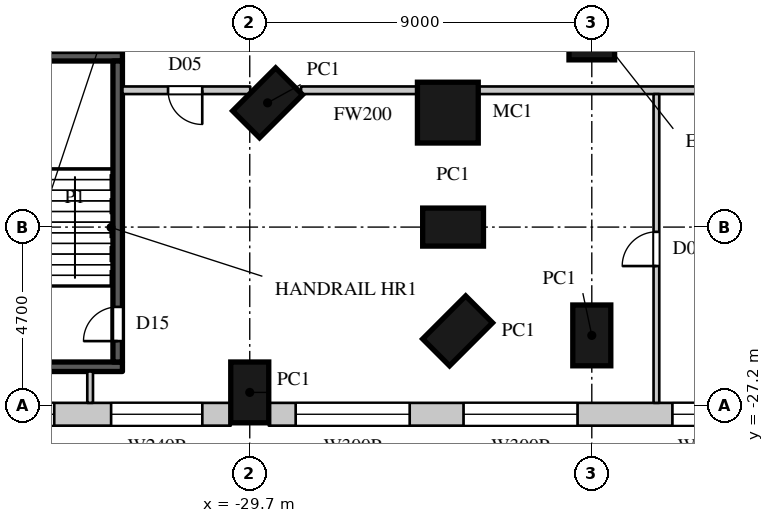
"""IFC4 building model, lengths in metres.
Left out: names, types, materials, properties, quantities, classifications, styles, units other than length and angle.
Written with IfcOpenShell. Run it as: python <this file> out.ifc"""

import sys

from ifc_helpers import new_model, si_unit, direction, frame, frame_2d, origin, origin_2d, place, context, subcontext, project, spatial, rectangle, circle, extrude, element, fill, save


model = new_model("IFC4")
c1 = context("Model", 3, precision=1e-05, world=origin(), true_north=direction((0.0, 1.0)))
c2 = subcontext(c1, "Body", "Model", "MODEL_VIEW")
j1 = project(units=[si_unit("LENGTHUNIT", "METRE"), si_unit("PLANEANGLEUNIT", "RADIAN")], contexts=[c1])
p1 = place(None, origin())
s1 = spatial("IfcSite", under=j1, at=p1, CompositionType="ELEMENT")
p2 = place(p1, origin())
s2 = spatial("IfcBuilding", under=s1, at=p2, CompositionType="ELEMENT")
p3 = place(p2, frame((0.0, 0.0, 36.0)))
s3 = spatial("IfcBuildingStorey", under=s2, at=p3, CompositionType="ELEMENT", Elevation=36.0)
p4 = place(p3, frame((-29.231, -19.231, 0.0), z_axis=(0.0, 0.0, 1.0), x_axis=(0.707106781187, -0.707106781187, 0.0)))
e1 = element("IfcColumn", 1, at=p4, inside=s3, PredefinedType="COLUMN", context=c2, shape_type="SweptSolid", body=[
    extrude(rectangle(XDim=1.0, YDim=1.6, at=origin_2d()), origin(), (0.0, 0.0, 1.0), 8.0),
])
p5 = place(p3, frame((-24.488, -19.488, 0.0), z_axis=(0.0, 0.0, 1.0), x_axis=(1.0, 0.0, 0.0)))
e2 = element("IfcColumn", 2, at=p5, inside=s3, PredefinedType="COLUMN", context=c2, shape_type="SweptSolid", body=[
    extrude(circle(Radius=0.8, at=origin_2d()), origin(), (0.0, 0.0, 1.0), 8.0),
])
for number, where, z_axis, x_axis in (
    (3, (-24.35, -22.5, 0.0), (0.0, 0.0, 1.0), (0.0, -1.0, 0.0)),
    (4, (-24.231, -25.231, 0.0), (0.0, 0.0, 1.0), (0.707, -0.707, 0.0)),
    (5, (-20.7, -25.35, 0.0), (0.0, 0.0, 1.0), (1.0, 0.0, 0.0)),
    (6, (-29.7, -26.85, 0.0), (0.0, 0.0, 1.0), (1.0, 0.0, 0.0)),
):
    element("IfcColumn", number, at=place(p3, frame(where, z_axis=z_axis, x_axis=x_axis)), inside=s3, PredefinedType="COLUMN", context=c2, shape_type="SweptSolid", body=[
        extrude(rectangle(XDim=1.0, YDim=1.6, at=origin_2d()), origin(), (0.0, 0.0, 1.0), 8.0),
    ])
p6 = place(p3, frame((-20.7, -17.5, 0.0), z_axis=(0.0, 0.0, 1.0), x_axis=(1.0, 0.0, 0.0)))
e7 = element("IfcColumn", 7, at=p6, inside=s3, PredefinedType="COLUMN", context=c2, shape_type="SweptSolid", body=[
    extrude(circle(Radius=0.6, at=origin_2d()), origin(), (0.0, 0.0, 1.0), 8.0),
])
p7 = place(p3, frame((-37.993, -27.425, 0.0), z_axis=(0.0, 0.0, 1.0), x_axis=(1.0, 0.0, 0.0)))
e8 = element("IfcWall", 8, at=p7, inside=s3, PredefinedType="ELEMENTEDWALL", context=c2, shape_type="SweptSolid", body=[
    extrude(rectangle(XDim=7.793, YDim=0.6, at=frame_2d((3.896, 0.0))), origin(), (0.0, 0.0, 1.0), 7.6),
])
p8 = place(p7, frame((0.748, 0.0, 1.5)))
e9 = element("IfcOpeningElement", 9, at=p8, cuts=e8, PredefinedType="OPENING", context=c2, shape_type="SweptSolid", body=[
    extrude(rectangle(XDim=2.4, YDim=2.4, at=frame_2d((1.2, 1.2))), frame((0.0, 0.31, 0.0), z_axis=(0.0, -1.0, 0.0), x_axis=(1.0, 0.0, 0.0)), (0.0, 0.0, 1.0), 0.62),
])
p9 = place(p7, frame((4.645, 0.0, 1.5)))
e10 = element("IfcOpeningElement", 10, at=p9, cuts=e8, PredefinedType="OPENING", context=c2, shape_type="SweptSolid", body=[
    extrude(rectangle(XDim=2.4, YDim=2.4, at=frame_2d((1.2, 1.2))), frame((0.0, 0.31, 0.0), z_axis=(0.0, -1.0, 0.0), x_axis=(1.0, 0.0, 0.0)), (0.0, 0.0, 1.0), 0.62),
])
p10 = place(p3, frame((-29.2, -27.425, 0.0), z_axis=(0.0, 0.0, 1.0), x_axis=(1.0, 0.0, 0.0)))
e11 = element("IfcWall", 11, at=p10, inside=s3, PredefinedType="ELEMENTEDWALL", context=c2, shape_type="SweptSolid", body=[
    extrude(rectangle(XDim=53.0, YDim=0.6, at=frame_2d((26.5, 0.0))), origin(), (0.0, 0.0, 1.0), 7.6),
])
p11 = place(p10, frame((0.708, 0.0, 1.5)))
e12 = element("IfcOpeningElement", 12, at=p11, cuts=e11, PredefinedType="OPENING", context=c2, shape_type="SweptSolid", body=[
    extrude(rectangle(XDim=3.0, YDim=2.4, at=frame_2d((1.5, 1.2))), frame((0.0, 0.31, 0.0), z_axis=(0.0, -1.0, 0.0), x_axis=(1.0, 0.0, 0.0)), (0.0, 0.0, 1.0), 0.62),
])
p12 = place(p10, frame((5.125, 0.0, 1.5)))
e13 = element("IfcOpeningElement", 13, at=p12, cuts=e11, PredefinedType="OPENING", context=c2, shape_type="SweptSolid", body=[
    extrude(rectangle(XDim=3.0, YDim=2.4, at=frame_2d((1.5, 1.2))), frame((0.0, 0.31, 0.0), z_axis=(0.0, -1.0, 0.0), x_axis=(1.0, 0.0, 0.0)), (0.0, 0.0, 1.0), 0.62),
])
p13 = place(p10, frame((13.958, 0.0, 1.5)))
e14 = element("IfcOpeningElement", 14, at=p13, cuts=e11, PredefinedType="OPENING", context=c2, shape_type="SweptSolid", body=[
    extrude(rectangle(XDim=3.0, YDim=2.4, at=frame_2d((1.5, 1.2))), frame((0.0, 0.31, 0.0), z_axis=(0.0, -1.0, 0.0), x_axis=(1.0, 0.0, 0.0)), (0.0, 0.0, 1.0), 0.62),
])
p14 = place(p10, frame((22.792, 0.0, 1.5)))
e15 = element("IfcOpeningElement", 15, at=p14, cuts=e11, PredefinedType="OPENING", context=c2, shape_type="SweptSolid", body=[
    extrude(rectangle(XDim=3.0, YDim=2.4, at=frame_2d((1.5, 1.2))), frame((0.0, 0.31, 0.0), z_axis=(0.0, -1.0, 0.0), x_axis=(1.0, 0.0, 0.0)), (0.0, 0.0, 1.0), 0.62),
])
p15 = place(p10, frame((27.208, 0.0, 1.5)))
e16 = element("IfcOpeningElement", 16, at=p15, cuts=e11, PredefinedType="OPENING", context=c2, shape_type="SweptSolid", body=[
    extrude(rectangle(XDim=3.0, YDim=2.4, at=frame_2d((1.5, 1.2))), frame((0.0, 0.31, 0.0), z_axis=(0.0, -1.0, 0.0), x_axis=(1.0, 0.0, 0.0)), (0.0, 0.0, 1.0), 0.62),
])
p16 = place(p10, frame((31.625, 0.0, 1.5)))
e17 = element("IfcOpeningElement", 17, at=p16, cuts=e11, PredefinedType="OPENING", context=c2, shape_type="SweptSolid", body=[
    extrude(rectangle(XDim=3.0, YDim=2.4, at=frame_2d((1.5, 1.2))), frame((0.0, 0.31, 0.0), z_axis=(0.0, -1.0, 0.0), x_axis=(1.0, 0.0, 0.0)), (0.0, 0.0, 1.0), 0.62),
])
p17 = place(p10, frame((36.042, 0.0, 1.5)))
e18 = element("IfcOpeningElement", 18, at=p17, cuts=e11, PredefinedType="OPENING", context=c2, shape_type="SweptSolid", body=[
    extrude(rectangle(XDim=3.0, YDim=2.4, at=frame_2d((1.5, 1.2))), frame((0.0, 0.31, 0.0), z_axis=(0.0, -1.0, 0.0), x_axis=(1.0, 0.0, 0.0)), (0.0, 0.0, 1.0), 0.62),
])
p18 = place(p10, frame((40.458, 0.0, 1.5)))
e19 = element("IfcOpeningElement", 19, at=p18, cuts=e11, PredefinedType="OPENING", context=c2, shape_type="SweptSolid", body=[
    extrude(rectangle(XDim=3.0, YDim=2.4, at=frame_2d((1.5, 1.2))), frame((0.0, 0.31, 0.0), z_axis=(0.0, -1.0, 0.0), x_axis=(1.0, 0.0, 0.0)), (0.0, 0.0, 1.0), 0.62),
])
p19 = place(p10, frame((44.875, 0.0, 1.5)))
e20 = element("IfcOpeningElement", 20, at=p19, cuts=e11, PredefinedType="OPENING", context=c2, shape_type="SweptSolid", body=[
    extrude(rectangle(XDim=3.0, YDim=2.4, at=frame_2d((1.5, 1.2))), frame((0.0, 0.31, 0.0), z_axis=(0.0, -1.0, 0.0), x_axis=(1.0, 0.0, 0.0)), (0.0, 0.0, 1.0), 0.62),
])
p20 = place(p10, frame((49.292, 0.0, 1.5)))
e21 = element("IfcOpeningElement", 21, at=p20, cuts=e11, PredefinedType="OPENING", context=c2, shape_type="SweptSolid", body=[
    extrude(rectangle(XDim=3.0, YDim=2.4, at=frame_2d((1.5, 1.2))), frame((0.0, 0.31, 0.0), z_axis=(0.0, -1.0, 0.0), x_axis=(1.0, 0.0, 0.0)), (0.0, 0.0, 1.0), 0.62),
])
p21 = place(p10, frame((10.621, 0.0, 1.5)))
e22 = element("IfcOpeningElement", 22, at=p21, cuts=e11, PredefinedType="OPENING", context=c2, shape_type="SweptSolid", body=[
    extrude(rectangle(XDim=1.8, YDim=2.4, at=frame_2d((0.9, 1.2))), frame((0.0, 0.31, 0.0), z_axis=(0.0, -1.0, 0.0), x_axis=(1.0, 0.0, 0.0)), (0.0, 0.0, 1.0), 0.62),
])
p22 = place(p10, frame((19.137, 0.0, 1.5)))
e23 = element("IfcOpeningElement", 23, at=p22, cuts=e11, PredefinedType="OPENING", context=c2, shape_type="SweptSolid", body=[
    extrude(rectangle(XDim=2.1, YDim=2.4, at=frame_2d((1.05, 1.2))), frame((0.0, 0.31, 0.0), z_axis=(0.0, -1.0, 0.0), x_axis=(1.0, 0.0, 0.0)), (0.0, 0.0, 1.0), 0.62),
])
p23 = place(p3, frame((-33.05, -18.9, 0.0), z_axis=(0.0, 0.0, 1.0), x_axis=(1.0, 0.0, 0.0)))
e24 = element("IfcWall", 24, at=p23, inside=s3, PredefinedType="PARTITIONING", context=c2, shape_type="SweptSolid", body=[
    extrude(rectangle(XDim=3.363, YDim=0.2, at=frame_2d((1.682, 0.0))), origin(), (0.0, 0.0, 1.0), 7.598),
])
p24 = place(p23, frame((1.2, 0.0, 0.0)))
e25 = element("IfcOpeningElement", 25, at=p24, cuts=e24, PredefinedType="OPENING", context=c2, shape_type="SweptSolid", body=[
    extrude(rectangle(XDim=0.9, YDim=2.2, at=frame_2d((0.45, 1.1))), frame((0.0, 0.11, 0.0), z_axis=(0.0, -1.0, 0.0), x_axis=(1.0, 0.0, 0.0)), (0.0, 0.0, 1.0), 0.22),
])
p25 = place(p3, frame((-28.35, -18.9, 0.0), z_axis=(0.0, 0.0, 1.0), x_axis=(1.0, 0.0, 0.0)))
e26 = element("IfcWall", 26, at=p25, inside=s3, PredefinedType="PARTITIONING", context=c2, shape_type="SweptSolid", body=[
    extrude(rectangle(XDim=3.244, YDim=0.2, at=frame_2d((1.622, 0.0))), origin(), (0.0, 0.0, 1.0), 7.598),
])
p26 = place(p3, frame((-23.869, -18.9, 0.0), z_axis=(0.0, 0.0, 1.0), x_axis=(1.0, 0.0, 0.0)))
e27 = element("IfcWall", 27, at=p26, inside=s3, PredefinedType="PARTITIONING", context=c2, shape_type="SweptSolid", body=[
    extrude(rectangle(XDim=13.269, YDim=0.2, at=frame_2d((6.635, 0.0))), origin(), (0.0, 0.0, 1.0), 7.598),
])
p27 = place(p26, frame((8.55, 0.0, 0.0)))
e28 = element("IfcOpeningElement", 28, at=p27, cuts=e27, PredefinedType="OPENING", context=c2, shape_type="SweptSolid", body=[
    extrude(rectangle(XDim=0.9, YDim=2.2, at=frame_2d((0.45, 1.1))), frame((0.0, 0.11, 0.0), z_axis=(0.0, -1.0, 0.0), x_axis=(1.0, 0.0, 0.0)), (0.0, 0.0, 1.0), 0.22),
])
p28 = place(p3, frame((-33.9, -27.125, 0.0), z_axis=(0.0, 0.0, 1.0), x_axis=(0.0, 1.0, 0.0)))
e29 = element("IfcWall", 29, at=p28, inside=s3, PredefinedType="PARTITIONING", context=c2, shape_type="SweptSolid", body=[
    extrude(rectangle(XDim=0.825, YDim=0.15, at=frame_2d((0.413, 0.0))), origin(), (0.0, 0.0, 1.0), 7.598),
])
p29 = place(p3, frame((-19.0, -27.125, 0.0), z_axis=(0.0, 0.0, 1.0), x_axis=(0.0, 1.0, 0.0)))
e30 = element("IfcWall", 30, at=p29, inside=s3, PredefinedType="PARTITIONING", context=c2, shape_type="SweptSolid", body=[
    extrude(rectangle(XDim=8.125, YDim=0.15, at=frame_2d((4.062, 0.0))), origin(), (0.0, 0.0, 1.0), 7.598),
])
p30 = place(p29, frame((3.6, 0.0, 0.0)))
e31 = element("IfcOpeningElement", 31, at=p30, cuts=e30, PredefinedType="OPENING", context=c2, shape_type="SweptSolid", body=[
    extrude(rectangle(XDim=0.9, YDim=2.2, at=frame_2d((0.45, 1.1))), frame((0.0, 0.085, 0.0), z_axis=(0.0, -1.0, 0.0), x_axis=(1.0, 0.0, 0.0)), (0.0, 0.0, 1.0), 0.17),
])
p31 = place(p3, frame((-37.545, -26.175, 0.0), z_axis=(0.0, 0.0, 1.0), x_axis=(1.0, 0.0, 0.0)))
e32 = element("IfcWall", 32, at=p31, inside=s3, PredefinedType="SHEAR", context=c2, shape_type="SweptSolid", body=[
    extrude(rectangle(XDim=4.495, YDim=0.25, at=frame_2d((2.248, 0.0))), origin(), (0.0, 0.0, 1.0), 7.6),
])
p32 = place(p3, frame((-37.75, -18.005, 0.0), z_axis=(0.0, 0.0, 1.0), x_axis=(1.0, 0.0, 0.0)))
e33 = element("IfcWall", 33, at=p32, inside=s3, PredefinedType="SHEAR", context=c2, shape_type="SweptSolid", body=[
    extrude(rectangle(XDim=4.7, YDim=0.25, at=frame_2d((2.35, 0.0))), origin(), (0.0, 0.0, 1.0), 7.6),
])
p33 = place(p3, frame((-33.175, -26.05, 0.0), z_axis=(0.0, 0.0, 1.0), x_axis=(0.0, 1.0, 0.0)))
e34 = element("IfcWall", 34, at=p33, inside=s3, PredefinedType="SHEAR", context=c2, shape_type="SweptSolid", body=[
    extrude(rectangle(XDim=7.92, YDim=0.25, at=frame_2d((3.96, 0.0))), origin(), (0.0, 0.0, 1.0), 7.6),
])
p34 = place(p33, frame((0.55, 0.0, 0.0)))
e35 = element("IfcOpeningElement", 35, at=p34, cuts=e34, PredefinedType="OPENING", context=c2, shape_type="SweptSolid", body=[
    extrude(rectangle(XDim=0.9, YDim=2.2, at=frame_2d((0.45, 1.1))), frame((0.0, 0.135, 0.0), z_axis=(0.0, -1.0, 0.0), x_axis=(1.0, 0.0, 0.0)), (0.0, 0.0, 1.0), 0.27),
])
p35 = place(p8, origin())
e36 = element("IfcWindow", 36, at=p35, inside=s3, PartitioningType="SINGLE_PANEL", PredefinedType="WINDOW", context=c2, shape_type="SweptSolid", body=[
    extrude(rectangle(XDim=2.4, YDim=2.4, at=frame_2d((1.2, 1.2))), frame((0.0, 0.06, 0.0), z_axis=(0.0, -1.0, 0.0), x_axis=(1.0, 0.0, 0.0)), (0.0, 0.0, 1.0), 0.06),
])
fill(e9, e36)
p36 = place(p9, origin())
e37 = element("IfcWindow", 37, at=p36, inside=s3, PartitioningType="SINGLE_PANEL", PredefinedType="WINDOW", context=c2, shape_type="SweptSolid", body=[
    extrude(rectangle(XDim=2.4, YDim=2.4, at=frame_2d((1.2, 1.2))), frame((0.0, 0.06, 0.0), z_axis=(0.0, -1.0, 0.0), x_axis=(1.0, 0.0, 0.0)), (0.0, 0.0, 1.0), 0.06),
])
fill(e10, e37)
p37 = place(p11, origin())
e38 = element("IfcWindow", 38, at=p37, inside=s3, PartitioningType="SINGLE_PANEL", PredefinedType="WINDOW", context=c2, shape_type="SweptSolid", body=[
    extrude(rectangle(XDim=3.0, YDim=2.4, at=frame_2d((1.5, 1.2))), frame((0.0, 0.06, 0.0), z_axis=(0.0, -1.0, 0.0), x_axis=(1.0, 0.0, 0.0)), (0.0, 0.0, 1.0), 0.06),
])
fill(e12, e38)
p38 = place(p12, origin())
e39 = element("IfcWindow", 39, at=p38, inside=s3, PartitioningType="SINGLE_PANEL", PredefinedType="WINDOW", context=c2, shape_type="SweptSolid", body=[
    extrude(rectangle(XDim=3.0, YDim=2.4, at=frame_2d((1.5, 1.2))), frame((0.0, 0.06, 0.0), z_axis=(0.0, -1.0, 0.0), x_axis=(1.0, 0.0, 0.0)), (0.0, 0.0, 1.0), 0.06),
])
fill(e13, e39)
p39 = place(p24, origin())
e40 = element("IfcDoor", 40, at=p39, inside=s3, OperationType="SINGLE_SWING_LEFT", PredefinedType="DOOR", context=c2, shape_type="SweptSolid", body=[
    extrude(rectangle(XDim=0.9, YDim=2.2, at=frame_2d((0.45, 1.1))), frame((0.0, 0.025, 0.0), z_axis=(0.0, -1.0, 0.0), x_axis=(1.0, 0.0, 0.0)), (0.0, 0.0, 1.0), 0.05),
])
fill(e25, e40)
p40 = place(p30, origin())
e41 = element("IfcDoor", 41, at=p40, inside=s3, OperationType="SINGLE_SWING_LEFT", PredefinedType="DOOR", context=c2, shape_type="SweptSolid", body=[
    extrude(rectangle(XDim=0.9, YDim=2.2, at=frame_2d((0.45, 1.1))), frame((0.0, 0.025, 0.0), z_axis=(0.0, -1.0, 0.0), x_axis=(1.0, 0.0, 0.0)), (0.0, 0.0, 1.0), 0.05),
])
fill(e31, e41)
p41 = place(p34, origin())
e42 = element("IfcDoor", 42, at=p41, inside=s3, OperationType="SINGLE_SWING_LEFT", PredefinedType="DOOR", context=c2, shape_type="SweptSolid", body=[
    extrude(rectangle(XDim=0.9, YDim=2.2, at=frame_2d((0.45, 1.1))), frame((0.0, 0.025, 0.0), z_axis=(0.0, -1.0, 0.0), x_axis=(1.0, 0.0, 0.0)), (0.0, 0.0, 1.0), 0.05),
])
fill(e35, e42)
p42 = place(p21, origin())
e43 = element("IfcWindow", 43, at=p42, inside=s3, PartitioningType="SINGLE_PANEL", PredefinedType="WINDOW", context=c2, shape_type="SweptSolid", body=[
    extrude(rectangle(XDim=1.8, YDim=2.4, at=frame_2d((0.9, 1.2))), frame((0.0, 0.06, 0.0), z_axis=(0.0, -1.0, 0.0), x_axis=(1.0, 0.0, 0.0)), (0.0, 0.0, 1.0), 0.06),
])
fill(e22, e43)
save(model, sys.argv[1])
